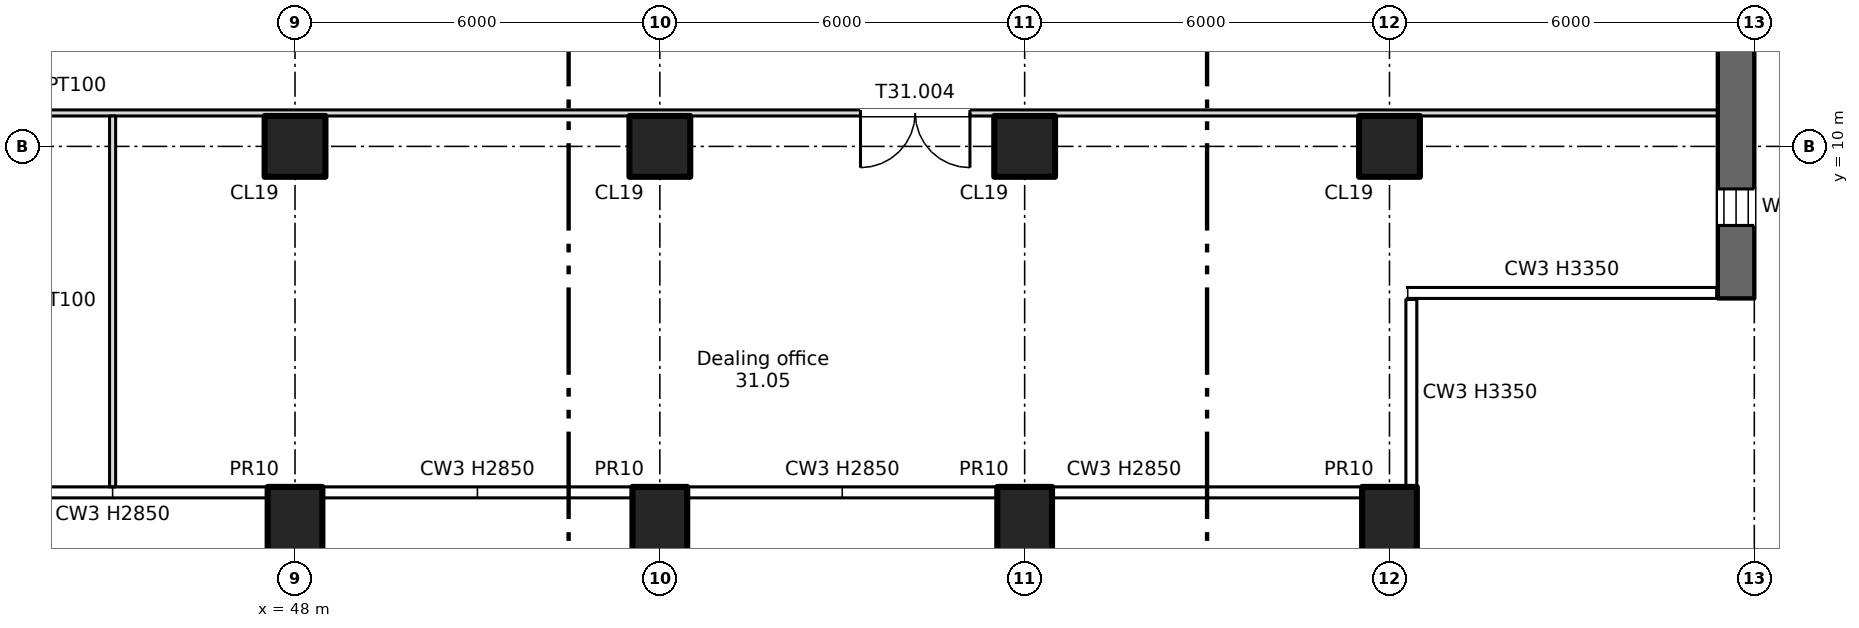
"""IFC4 building model, lengths in metres.
Left out: names, types, materials, properties, quantities, classifications, styles, units other than length and angle.
Written with IfcOpenShell. Run it as: python <this file> out.ifc"""

import sys

from ifc_helpers import new_model, si_unit, direction, frame, frame_2d, origin, origin_2d, place, context, subcontext, project, spatial, rectangle, extrude, element, fill, save


model = new_model("IFC4")
c1 = context("Model", 3, precision=1e-05, world=origin(), true_north=direction((0.0, 1.0)))
c2 = subcontext(c1, "Body", "Model", "MODEL_VIEW")
j1 = project(units=[si_unit("LENGTHUNIT", "METRE"), si_unit("PLANEANGLEUNIT", "RADIAN")], contexts=[c1])
p1 = place(None, origin())
s1 = spatial("IfcSite", under=j1, at=p1, CompositionType="ELEMENT")
p2 = place(p1, origin())
s2 = spatial("IfcBuilding", under=s1, at=p2, CompositionType="ELEMENT")
p3 = place(p2, frame((0.0, 0.0, 215.5)))
s3 = spatial("IfcBuildingStorey", under=s2, at=p3, CompositionType="ELEMENT", Elevation=215.5)
for number, where, z_axis, x_axis in (
    (1, (48.0, 3.7, -0.4), (0.0, 0.0, 1.0), (1.0, 0.0, 0.0)),
    (2, (54.0, 3.7, -0.4), (0.0, 0.0, 1.0), (1.0, 0.0, 0.0)),
    (3, (60.0, 3.7, -0.4), (0.0, 0.0, 1.0), (1.0, 0.0, 0.0)),
    (4, (66.0, 3.7, -0.4), (0.0, 0.0, 1.0), (1.0, 0.0, 0.0)),
):
    element("IfcColumn", number, at=place(p3, frame(where, z_axis=z_axis, x_axis=x_axis)), inside=s3, PredefinedType="COLUMN", context=c2, shape_type="SweptSolid", body=[
        extrude(rectangle(XDim=0.9, YDim=1.4, at=origin_2d()), origin(), (0.0, 0.0, 1.0), 3.75),
    ])
for number, where, z_axis, x_axis in (
    (5, (48.0, 10.0, 0.0), (0.0, 0.0, 1.0), (1.0, 0.0, 0.0)),
    (6, (54.0, 10.0, 0.0), (0.0, 0.0, 1.0), (1.0, 0.0, 0.0)),
    (7, (60.0, 10.0, 0.0), (0.0, 0.0, 1.0), (1.0, 0.0, 0.0)),
    (8, (66.0, 10.0, 0.0), (0.0, 0.0, 1.0), (1.0, 0.0, 0.0)),
):
    element("IfcColumn", number, at=place(p3, frame(where, z_axis=z_axis, x_axis=x_axis)), inside=s3, PredefinedType="COLUMN", context=c2, shape_type="SweptSolid", body=[
        extrude(rectangle(XDim=1.0, YDim=1.0, at=origin_2d()), origin(), (0.0, 0.0, 1.0), 3.35),
    ])
p4 = place(p3, frame((71.7, 7.5, 0.0), z_axis=(0.0, 0.0, 1.0), x_axis=(0.0, 1.0, 0.0)))
e9 = element("IfcWall", 9, at=p4, inside=s3, PredefinedType="SHEAR", context=c2, shape_type="SweptSolid", body=[
    extrude(rectangle(XDim=34.0, YDim=0.6, at=frame_2d((17.0, 0.0))), origin(), (0.0, 0.0, 1.0), 3.35),
])
p5 = place(p4, frame((1.2, 0.0, 0.6)))
e10 = element("IfcOpeningElement", 10, at=p5, cuts=e9, PredefinedType="OPENING", context=c2, shape_type="SweptSolid", body=[
    extrude(rectangle(XDim=0.6, YDim=2.4, at=frame_2d((0.3, 1.2))), frame((0.0, 0.31, 0.0), z_axis=(0.0, -1.0, 0.0), x_axis=(1.0, 0.0, 0.0)), (0.0, 0.0, 1.0), 0.62),
])
p6 = place(p4, frame((7.2, 0.0, 0.6)))
e11 = element("IfcOpeningElement", 11, at=p6, cuts=e9, PredefinedType="OPENING", context=c2, shape_type="SweptSolid", body=[
    extrude(rectangle(XDim=0.6, YDim=2.4, at=frame_2d((0.3, 1.2))), frame((0.0, 0.31, 0.0), z_axis=(0.0, -1.0, 0.0), x_axis=(1.0, 0.0, 0.0)), (0.0, 0.0, 1.0), 0.62),
])
p7 = place(p4, frame((13.2, 0.0, 0.6)))
e12 = element("IfcOpeningElement", 12, at=p7, cuts=e9, PredefinedType="OPENING", context=c2, shape_type="SweptSolid", body=[
    extrude(rectangle(XDim=0.6, YDim=2.4, at=frame_2d((0.3, 1.2))), frame((0.0, 0.31, 0.0), z_axis=(0.0, -1.0, 0.0), x_axis=(1.0, 0.0, 0.0)), (0.0, 0.0, 1.0), 0.62),
])
p8 = place(p4, frame((19.2, 0.0, 0.6)))
e13 = element("IfcOpeningElement", 13, at=p8, cuts=e9, PredefinedType="OPENING", context=c2, shape_type="SweptSolid", body=[
    extrude(rectangle(XDim=0.6, YDim=2.4, at=frame_2d((0.3, 1.2))), frame((0.0, 0.31, 0.0), z_axis=(0.0, -1.0, 0.0), x_axis=(1.0, 0.0, 0.0)), (0.0, 0.0, 1.0), 0.62),
])
p9 = place(p4, frame((25.2, 0.0, 0.6)))
e14 = element("IfcOpeningElement", 14, at=p9, cuts=e9, PredefinedType="OPENING", context=c2, shape_type="SweptSolid", body=[
    extrude(rectangle(XDim=0.6, YDim=2.4, at=frame_2d((0.3, 1.2))), frame((0.0, 0.31, 0.0), z_axis=(0.0, -1.0, 0.0), x_axis=(1.0, 0.0, 0.0)), (0.0, 0.0, 1.0), 0.62),
])
p10 = place(p4, frame((31.2, 0.0, 0.6)))
e15 = element("IfcOpeningElement", 15, at=p10, cuts=e9, PredefinedType="OPENING", context=c2, shape_type="SweptSolid", body=[
    extrude(rectangle(XDim=0.6, YDim=2.4, at=frame_2d((0.3, 1.2))), frame((0.0, 0.31, 0.0), z_axis=(0.0, -1.0, 0.0), x_axis=(1.0, 0.0, 0.0)), (0.0, 0.0, 1.0), 0.62),
])
p11 = place(p3, frame((6.6, 10.55, 0.0), z_axis=(0.0, 0.0, 1.0), x_axis=(1.0, 0.0, 0.0)))
e16 = element("IfcWall", 16, at=p11, inside=s3, PredefinedType="PARTITIONING", context=c2, shape_type="SweptSolid", body=[
    extrude(rectangle(XDim=64.8, YDim=0.1, at=frame_2d((32.4, 0.0))), origin(), (0.0, 0.0, 1.0), 3.35),
])
p12 = place(p11, frame((9.4, 0.0, 0.0)))
e17 = element("IfcOpeningElement", 17, at=p12, cuts=e16, PredefinedType="OPENING", context=c2, shape_type="SweptSolid", body=[
    extrude(rectangle(XDim=1.0, YDim=2.1, at=frame_2d((0.5, 1.05))), frame((0.0, 0.06, 0.0), z_axis=(0.0, -1.0, 0.0), x_axis=(1.0, 0.0, 0.0)), (0.0, 0.0, 1.0), 0.12),
])
p13 = place(p11, frame((18.4, 0.0, 0.0)))
e18 = element("IfcOpeningElement", 18, at=p13, cuts=e16, PredefinedType="OPENING", context=c2, shape_type="SweptSolid", body=[
    extrude(rectangle(XDim=1.0, YDim=2.1, at=frame_2d((0.5, 1.05))), frame((0.0, 0.06, 0.0), z_axis=(0.0, -1.0, 0.0), x_axis=(1.0, 0.0, 0.0)), (0.0, 0.0, 1.0), 0.12),
])
p14 = place(p11, frame((30.0, 0.0, 0.0)))
e19 = element("IfcOpeningElement", 19, at=p14, cuts=e16, PredefinedType="OPENING", context=c2, shape_type="SweptSolid", body=[
    extrude(rectangle(XDim=1.8, YDim=2.1, at=frame_2d((0.9, 1.05))), frame((0.0, 0.06, 0.0), z_axis=(0.0, -1.0, 0.0), x_axis=(1.0, 0.0, 0.0)), (0.0, 0.0, 1.0), 0.12),
])
p15 = place(p11, frame((50.7, 0.0, 0.0)))
e20 = element("IfcOpeningElement", 20, at=p15, cuts=e16, PredefinedType="OPENING", context=c2, shape_type="SweptSolid", body=[
    extrude(rectangle(XDim=1.8, YDim=2.1, at=frame_2d((0.9, 1.05))), frame((0.0, 0.06, 0.0), z_axis=(0.0, -1.0, 0.0), x_axis=(1.0, 0.0, 0.0)), (0.0, 0.0, 1.0), 0.12),
])
p16 = place(p11, frame((2.2, 0.0, 0.0)))
e21 = element("IfcOpeningElement", 21, at=p16, cuts=e16, PredefinedType="OPENING", context=c2, shape_type="SweptSolid", body=[
    extrude(rectangle(XDim=1.0, YDim=2.1, at=frame_2d((0.5, 1.05))), frame((0.0, 0.06, 0.0), z_axis=(0.0, -1.0, 0.0), x_axis=(1.0, 0.0, 0.0)), (0.0, 0.0, 1.0), 0.12),
])
p17 = place(p3, frame((45.0, 4.4, 0.0), z_axis=(0.0, 0.0, 1.0), x_axis=(0.0, 1.0, 0.0)))
e22 = element("IfcWall", 22, at=p17, inside=s3, PredefinedType="PARTITIONING", context=c2, shape_type="SweptSolid", body=[
    extrude(rectangle(XDim=6.1, YDim=0.1, at=frame_2d((3.05, 0.0))), origin(), (0.0, 0.0, 1.0), 3.35),
])
p18 = place(p5, origin())
e23 = element("IfcWindow", 23, at=p18, inside=s3, PartitioningType="SINGLE_PANEL", PredefinedType="WINDOW", context=c2, shape_type="SweptSolid", body=[
    extrude(rectangle(XDim=0.6, YDim=2.4, at=frame_2d((0.3, 1.2))), frame((0.0, 0.03, 0.0), z_axis=(0.0, -1.0, 0.0), x_axis=(1.0, 0.0, 0.0)), (0.0, 0.0, 1.0), 0.06),
])
fill(e10, e23)
p19 = place(p15, origin())
e24 = element("IfcDoor", 24, at=p19, inside=s3, OperationType="DOUBLE_DOOR_SINGLE_SWING", PredefinedType="DOOR", context=c2, shape_type="SweptSolid", body=[
    extrude(rectangle(XDim=1.8, YDim=2.1, at=frame_2d((0.9, 1.05))), frame((0.0, 0.025, 0.0), z_axis=(0.0, -1.0, 0.0), x_axis=(1.0, 0.0, 0.0)), (0.0, 0.0, 1.0), 0.05),
])
fill(e20, e24)
save(model, sys.argv[1])
